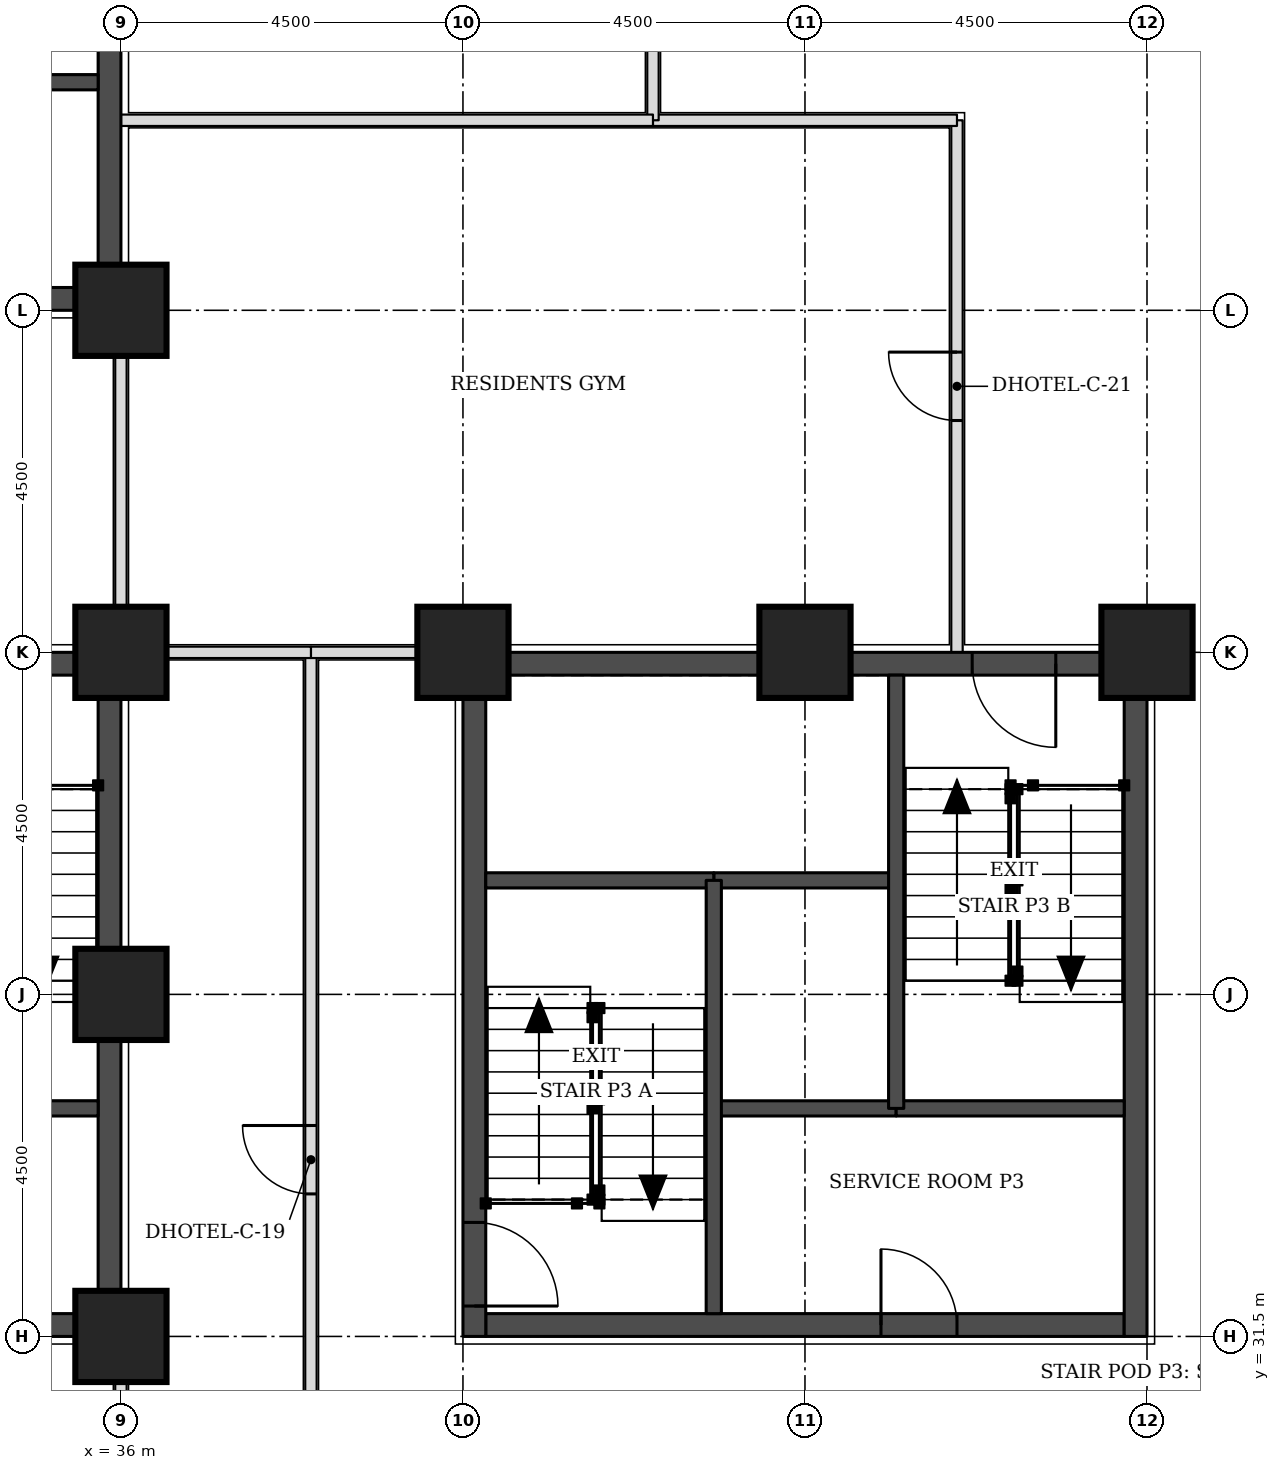
"""IFC4 building model, lengths in metres.
Left out: names, types, materials, properties, quantities, classifications, styles, units other than length and angle.
Written with IfcOpenShell. Run it as: python <this file> out.ifc"""

import sys

from ifc_helpers import new_model, si_unit, direction, frame, frame_2d, origin, origin_2d, place, context, subcontext, project, spatial, rectangle, extrude, element, fill, save


model = new_model("IFC4")
c1 = context("Model", 3, precision=1e-05, world=origin(), true_north=direction((0.0, 1.0)))
c2 = subcontext(c1, "Body", "Model", "MODEL_VIEW")
j1 = project(units=[si_unit("LENGTHUNIT", "METRE"), si_unit("PLANEANGLEUNIT", "RADIAN")], contexts=[c1])
p1 = place(None, origin())
s1 = spatial("IfcSite", under=j1, at=p1, CompositionType="ELEMENT")
p2 = place(p1, origin())
s2 = spatial("IfcBuilding", under=s1, at=p2, CompositionType="ELEMENT")
p3 = place(p2, frame((0.0, 0.0, 56.1)))
s3 = spatial("IfcBuildingStorey", under=s2, at=p3, CompositionType="ELEMENT", Elevation=56.1)
for number, where, z_axis, x_axis in (
    (1, (36.0, 31.5, 0.0), (0.0, 0.0, 1.0), (1.0, 0.0, 0.0)),
    (2, (36.0, 36.0, 0.0), (0.0, 0.0, 1.0), (1.0, 0.0, 0.0)),
    (3, (36.0, 40.5, 0.0), (0.0, 0.0, 1.0), (1.0, 0.0, 0.0)),
    (4, (40.5, 40.5, 0.0), (0.0, 0.0, 1.0), (1.0, 0.0, 0.0)),
    (5, (45.0, 40.5, 0.0), (0.0, 0.0, 1.0), (1.0, 0.0, 0.0)),
    (6, (49.5, 40.5, 0.0), (0.0, 0.0, 1.0), (1.0, 0.0, 0.0)),
    (7, (36.0, 45.0, 0.0), (0.0, 0.0, 1.0), (1.0, 0.0, 0.0)),
):
    element("IfcColumn", number, at=place(p3, frame(where, z_axis=z_axis, x_axis=x_axis)), inside=s3, PredefinedType="COLUMN", context=c2, shape_type="SweptSolid", body=[
        extrude(rectangle(XDim=1.2, YDim=1.2, at=origin_2d()), origin(), (0.0, 0.0, 1.0), 3.3),
    ])
p4 = place(p3, frame((27.3, 45.15, 0.0), z_axis=(0.0, 0.0, 1.0), x_axis=(1.0, 0.0, 0.0)))
e8 = element("IfcWall", 8, at=p4, inside=s3, PredefinedType="SHEAR", context=c2, shape_type="SweptSolid", body=[
    extrude(rectangle(XDim=8.4, YDim=0.3, at=frame_2d((4.2, 0.0))), origin(), (0.0, 0.0, 1.0), 3.3),
])
p5 = place(p4, frame((5.2, 0.0, 0.0)))
e9 = element("IfcOpeningElement", 9, at=p5, cuts=e8, PredefinedType="OPENING", context=c2, shape_type="SweptSolid", body=[
    extrude(rectangle(XDim=1.0, YDim=2.1, at=frame_2d((0.5, 1.05))), frame((0.0, 0.16, 0.0), z_axis=(0.0, -1.0, 0.0), x_axis=(1.0, 0.0, 0.0)), (0.0, 0.0, 1.0), 0.32),
])
p6 = place(p3, frame((35.85, 45.0, 0.0), z_axis=(0.0, 0.0, 1.0), x_axis=(0.0, 1.0, 0.0)))
e10 = element("IfcWall", 10, at=p6, inside=s3, PredefinedType="SHEAR", context=c2, shape_type="SweptSolid", body=[
    extrude(rectangle(XDim=9.0, YDim=0.3, at=frame_2d((4.5, 0.0))), origin(), (0.0, 0.0, 1.0), 3.3),
])
p7 = place(p3, frame((40.8, 31.65, 0.0), z_axis=(0.0, 0.0, 1.0), x_axis=(1.0, 0.0, 0.0)))
e11 = element("IfcWall", 11, at=p7, inside=s3, PredefinedType="SHEAR", context=c2, shape_type="SweptSolid", body=[
    extrude(rectangle(XDim=8.4, YDim=0.3, at=frame_2d((4.2, 0.0))), origin(), (0.0, 0.0, 1.0), 3.3),
])
p8 = place(p7, frame((5.2, 0.0, 0.0)))
e12 = element("IfcOpeningElement", 12, at=p8, cuts=e11, PredefinedType="OPENING", context=c2, shape_type="SweptSolid", body=[
    extrude(rectangle(XDim=1.0, YDim=2.1, at=frame_2d((0.5, 1.05))), frame((0.0, 0.16, 0.0), z_axis=(0.0, -1.0, 0.0), x_axis=(1.0, 0.0, 0.0)), (0.0, 0.0, 1.0), 0.32),
])
p9 = place(p3, frame((40.8, 40.35, 0.0), z_axis=(0.0, 0.0, 1.0), x_axis=(1.0, 0.0, 0.0)))
e13 = element("IfcWall", 13, at=p9, inside=s3, PredefinedType="SHEAR", context=c2, shape_type="SweptSolid", body=[
    extrude(rectangle(XDim=8.4, YDim=0.3, at=frame_2d((4.2, 0.0))), origin(), (0.0, 0.0, 1.0), 3.3),
])
p10 = place(p9, frame((6.4, 0.0, 0.0)))
e14 = element("IfcOpeningElement", 14, at=p10, cuts=e13, PredefinedType="OPENING", context=c2, shape_type="SweptSolid", body=[
    extrude(rectangle(XDim=1.1, YDim=2.1, at=frame_2d((0.55, 1.05))), frame((0.0, 0.16, 0.0), z_axis=(0.0, -1.0, 0.0), x_axis=(1.0, 0.0, 0.0)), (0.0, 0.0, 1.0), 0.32),
])
p11 = place(p3, frame((40.65, 31.5, 0.0), z_axis=(0.0, 0.0, 1.0), x_axis=(0.0, 1.0, 0.0)))
e15 = element("IfcWall", 15, at=p11, inside=s3, PredefinedType="SHEAR", context=c2, shape_type="SweptSolid", body=[
    extrude(rectangle(XDim=9.0, YDim=0.3, at=frame_2d((4.5, 0.0))), origin(), (0.0, 0.0, 1.0), 3.3),
])
p12 = place(p11, frame((0.4, 0.0, 0.0)))
e16 = element("IfcOpeningElement", 16, at=p12, cuts=e15, PredefinedType="OPENING", context=c2, shape_type="SweptSolid", body=[
    extrude(rectangle(XDim=1.1, YDim=2.1, at=frame_2d((0.55, 1.05))), frame((0.0, 0.16, 0.0), z_axis=(0.0, -1.0, 0.0), x_axis=(1.0, 0.0, 0.0)), (0.0, 0.0, 1.0), 0.32),
])
p13 = place(p3, frame((49.35, 31.5, 0.0), z_axis=(0.0, 0.0, 1.0), x_axis=(0.0, 1.0, 0.0)))
e17 = element("IfcWall", 17, at=p13, inside=s3, PredefinedType="SHEAR", context=c2, shape_type="SweptSolid", body=[
    extrude(rectangle(XDim=9.0, YDim=0.3, at=frame_2d((4.5, 0.0))), origin(), (0.0, 0.0, 1.0), 3.3),
])
p14 = place(p3, frame((27.3, 31.65, 0.0), z_axis=(0.0, 0.0, 1.0), x_axis=(1.0, 0.0, 0.0)))
e18 = element("IfcWall", 18, at=p14, inside=s3, PredefinedType="SHEAR", context=c2, shape_type="SweptSolid", body=[
    extrude(rectangle(XDim=8.4, YDim=0.3, at=frame_2d((4.2, 0.0))), origin(), (0.0, 0.0, 1.0), 3.3),
])
p15 = place(p14, frame((4.8, 0.0, 0.0)))
e19 = element("IfcOpeningElement", 19, at=p15, cuts=e18, PredefinedType="OPENING", context=c2, shape_type="SweptSolid", body=[
    extrude(rectangle(XDim=1.8, YDim=2.1, at=frame_2d((0.9, 1.05))), frame((0.0, 0.16, 0.0), z_axis=(0.0, -1.0, 0.0), x_axis=(1.0, 0.0, 0.0)), (0.0, 0.0, 1.0), 0.32),
])
p16 = place(p3, frame((27.3, 40.35, 0.0), z_axis=(0.0, 0.0, 1.0), x_axis=(1.0, 0.0, 0.0)))
e20 = element("IfcWall", 20, at=p16, inside=s3, PredefinedType="SHEAR", context=c2, shape_type="SweptSolid", body=[
    extrude(rectangle(XDim=8.4, YDim=0.3, at=frame_2d((4.2, 0.0))), origin(), (0.0, 0.0, 1.0), 3.3),
])
p17 = place(p16, frame((6.4, 0.0, 0.0)))
e21 = element("IfcOpeningElement", 21, at=p17, cuts=e20, PredefinedType="OPENING", context=c2, shape_type="SweptSolid", body=[
    extrude(rectangle(XDim=1.1, YDim=2.1, at=frame_2d((0.55, 1.05))), frame((0.0, 0.16, 0.0), z_axis=(0.0, -1.0, 0.0), x_axis=(1.0, 0.0, 0.0)), (0.0, 0.0, 1.0), 0.32),
])
p18 = place(p3, frame((35.85, 31.5, 0.0), z_axis=(0.0, 0.0, 1.0), x_axis=(0.0, 1.0, 0.0)))
e22 = element("IfcWall", 22, at=p18, inside=s3, PredefinedType="SHEAR", context=c2, shape_type="SweptSolid", body=[
    extrude(rectangle(XDim=9.0, YDim=0.3, at=frame_2d((4.5, 0.0))), origin(), (0.0, 0.0, 1.0), 3.3),
])
p19 = place(p3, frame((38.5, 27.15, 0.0), z_axis=(0.0, 0.0, 1.0), x_axis=(0.0, 1.0, 0.0)))
e23 = element("IfcWall", 23, at=p19, inside=s3, PredefinedType="PARTITIONING", context=c2, shape_type="SweptSolid", body=[
    extrude(rectangle(XDim=13.35, YDim=0.15, at=frame_2d((6.675, 0.0))), origin(), (0.0, 0.0, 1.0), 3.08),
])
p20 = place(p19, frame((6.225, 0.0, 0.0)))
e24 = element("IfcOpeningElement", 24, at=p20, cuts=e23, PredefinedType="OPENING", context=c2, shape_type="SweptSolid", body=[
    extrude(rectangle(XDim=0.9, YDim=2.1, at=frame_2d((0.45, 1.05))), frame((0.0, 0.085, 0.0), z_axis=(0.0, -1.0, 0.0), x_axis=(1.0, 0.0, 0.0)), (0.0, 0.0, 1.0), 0.17),
])
for number, where, z_axis, x_axis in (
    (25, (36.0, 29.5, 0.0), (0.0, 0.0, 1.0), (0.0, 1.0, 0.0)),
    (26, (38.5, 40.5, 0.0), (0.0, 0.0, 1.0), (1.0, 0.0, 0.0)),
):
    element("IfcWall", number, at=place(p3, frame(where, z_axis=z_axis, x_axis=x_axis)), inside=s3, PredefinedType="PARTITIONING", context=c2, shape_type="SweptSolid", body=[
        extrude(rectangle(XDim=1.95, YDim=0.15, at=frame_2d((0.975, 0.0))), origin(), (0.0, 0.0, 1.0), 2.33),
    ])
p21 = place(p3, frame((36.0, 40.55, 0.0), z_axis=(0.0, 0.0, 1.0), x_axis=(0.0, 1.0, 0.0)))
e27 = element("IfcWall", 27, at=p21, inside=s3, PredefinedType="PARTITIONING", context=c2, shape_type="SweptSolid", body=[
    extrude(rectangle(XDim=4.4, YDim=0.15, at=frame_2d((2.2, 0.0))), origin(), (0.0, 0.0, 1.0), 2.33),
])
p22 = place(p3, frame((47.0, 40.5, 0.0), z_axis=(0.0, 0.0, 1.0), x_axis=(0.0, 1.0, 0.0)))
e28 = element("IfcWall", 28, at=p22, inside=s3, PredefinedType="PARTITIONING", context=c2, shape_type="SweptSolid", body=[
    extrude(rectangle(XDim=7.0, YDim=0.15, at=frame_2d((3.5, 0.0))), origin(), (0.0, 0.0, 1.0), 3.08),
])
p23 = place(p22, frame((3.05, 0.0, 0.0)))
e29 = element("IfcOpeningElement", 29, at=p23, cuts=e28, PredefinedType="OPENING", context=c2, shape_type="SweptSolid", body=[
    extrude(rectangle(XDim=0.9, YDim=2.1, at=frame_2d((0.45, 1.05))), frame((0.0, 0.085, 0.0), z_axis=(0.0, -1.0, 0.0), x_axis=(1.0, 0.0, 0.0)), (0.0, 0.0, 1.0), 0.17),
])
p24 = place(p3, frame((43.0, 47.5, 0.0), z_axis=(0.0, 0.0, 1.0), x_axis=(1.0, 0.0, 0.0)))
e30 = element("IfcWall", 30, at=p24, inside=s3, PredefinedType="PARTITIONING", context=c2, shape_type="SweptSolid", body=[
    extrude(rectangle(XDim=4.0, YDim=0.15, at=frame_2d((2.0, 0.0))), origin(), (0.0, 0.0, 1.0), 3.08),
])
p25 = place(p3, frame((43.0, 47.5, 0.0), z_axis=(0.0, 0.0, 1.0), x_axis=(0.0, 1.0, 0.0)))
e31 = element("IfcWall", 31, at=p25, inside=s3, PredefinedType="PARTITIONING", context=c2, shape_type="SweptSolid", body=[
    extrude(rectangle(XDim=6.5, YDim=0.15, at=frame_2d((3.25, 0.0))), origin(), (0.0, 0.0, 1.0), 3.08),
])
p26 = place(p3, frame((36.05, 40.5, 0.0), z_axis=(0.0, 0.0, 1.0), x_axis=(1.0, 0.0, 0.0)))
e32 = element("IfcWall", 32, at=p26, inside=s3, PredefinedType="PARTITIONING", context=c2, shape_type="SweptSolid", body=[
    extrude(rectangle(XDim=2.45, YDim=0.15, at=frame_2d((1.225, 0.0))), origin(), (0.0, 0.0, 1.0), 2.33),
])
p27 = place(p3, frame((36.0, 47.5, 0.0), z_axis=(0.0, 0.0, 1.0), x_axis=(1.0, 0.0, 0.0)))
e33 = element("IfcWall", 33, at=p27, inside=s3, PredefinedType="PARTITIONING", context=c2, shape_type="SweptSolid", body=[
    extrude(rectangle(XDim=7.0, YDim=0.15, at=frame_2d((3.5, 0.0))), origin(), (0.0, 0.0, 1.0), 3.08),
])
p28 = place(p3, frame((32.7, 48.0, 0.0), z_axis=(0.0, 0.0, 1.0), x_axis=(1.0, 0.0, 0.0)))
e34 = element("IfcWall", 34, at=p28, inside=s3, PredefinedType="SOLIDWALL", context=c2, shape_type="SweptSolid", body=[
    extrude(rectangle(XDim=3.0, YDim=0.2, at=frame_2d((1.5, 0.0))), origin(), (0.0, 0.0, 1.0), 3.08),
])
p29 = place(p3, frame((43.8, 34.5, 0.0), z_axis=(0.0, 0.0, 1.0), x_axis=(1.0, 0.0, 0.0)))
e35 = element("IfcWall", 35, at=p29, inside=s3, PredefinedType="SOLIDWALL", context=c2, shape_type="SweptSolid", body=[
    extrude(rectangle(XDim=2.4, YDim=0.2, at=frame_2d((1.2, 0.0))), origin(), (0.0, 0.0, 1.0), 3.08),
])
p30 = place(p3, frame((46.2, 34.5, 0.0), z_axis=(0.0, 0.0, 1.0), x_axis=(1.0, 0.0, 0.0)))
e36 = element("IfcWall", 36, at=p30, inside=s3, PredefinedType="SOLIDWALL", context=c2, shape_type="SweptSolid", body=[
    extrude(rectangle(XDim=3.0, YDim=0.2, at=frame_2d((1.5, 0.0))), origin(), (0.0, 0.0, 1.0), 3.08),
])
p31 = place(p3, frame((43.8, 37.5, 0.0), z_axis=(0.0, 0.0, 1.0), x_axis=(1.0, 0.0, 0.0)))
e37 = element("IfcWall", 37, at=p31, inside=s3, PredefinedType="SOLIDWALL", context=c2, shape_type="SweptSolid", body=[
    extrude(rectangle(XDim=2.4, YDim=0.2, at=frame_2d((1.2, 0.0))), origin(), (0.0, 0.0, 1.0), 3.3),
])
p32 = place(p3, frame((40.8, 37.5, 0.0), z_axis=(0.0, 0.0, 1.0), x_axis=(1.0, 0.0, 0.0)))
e38 = element("IfcWall", 38, at=p32, inside=s3, PredefinedType="SOLIDWALL", context=c2, shape_type="SweptSolid", body=[
    extrude(rectangle(XDim=3.0, YDim=0.2, at=frame_2d((1.5, 0.0))), origin(), (0.0, 0.0, 1.0), 3.08),
])
for number, where, z_axis, x_axis in (
    (39, (43.8, 31.8, 0.0), (0.0, 0.0, 1.0), (0.0, 1.0, 0.0)),
    (40, (46.2, 34.5, 0.0), (0.0, 0.0, 1.0), (0.0, 1.0, 0.0)),
):
    element("IfcWall", number, at=place(p3, frame(where, z_axis=z_axis, x_axis=x_axis)), inside=s3, PredefinedType="SOLIDWALL", context=c2, shape_type="SweptSolid", body=[
        extrude(rectangle(XDim=5.7, YDim=0.2, at=frame_2d((2.85, 0.0))), origin(), (0.0, 0.0, 1.0), 3.08),
    ])
p33 = place(p3, frame((30.3, 34.5, 0.0), z_axis=(0.0, 0.0, 1.0), x_axis=(1.0, 0.0, 0.0)))
e41 = element("IfcWall", 41, at=p33, inside=s3, PredefinedType="SOLIDWALL", context=c2, shape_type="SweptSolid", body=[
    extrude(rectangle(XDim=5.4, YDim=0.2, at=frame_2d((2.7, 0.0))), origin(), (0.0, 0.0, 1.0), 3.08),
])
p34 = place(p33, frame((0.45, 0.0, 0.0)))
e42 = element("IfcOpeningElement", 42, at=p34, cuts=e41, PredefinedType="OPENING", context=c2, shape_type="SweptSolid", body=[
    extrude(rectangle(XDim=1.5, YDim=2.1, at=frame_2d((0.75, 1.05))), frame((0.0, 0.11, 0.0), z_axis=(0.0, -1.0, 0.0), x_axis=(1.0, 0.0, 0.0)), (0.0, 0.0, 1.0), 0.22),
])
p35 = place(p20, origin())
e43 = element("IfcDoor", 43, at=p35, inside=s3, OperationType="SINGLE_SWING_RIGHT", PredefinedType="DOOR", context=c2, shape_type="SweptSolid", body=[
    extrude(rectangle(XDim=0.9, YDim=2.1, at=frame_2d((0.45, 1.05))), frame((0.0, 0.025, 0.0), z_axis=(0.0, -1.0, 0.0), x_axis=(1.0, 0.0, 0.0)), (0.0, 0.0, 1.0), 0.05),
])
fill(e24, e43)
p36 = place(p23, origin())
e44 = element("IfcDoor", 44, at=p36, inside=s3, OperationType="SINGLE_SWING_RIGHT", PredefinedType="DOOR", context=c2, shape_type="SweptSolid", body=[
    extrude(rectangle(XDim=0.9, YDim=2.1, at=frame_2d((0.45, 1.05))), frame((0.0, 0.025, 0.0), z_axis=(0.0, -1.0, 0.0), x_axis=(1.0, 0.0, 0.0)), (0.0, 0.0, 1.0), 0.05),
])
fill(e29, e44)
p37 = place(p12, frame((1.1, 0.0, 0.0), z_axis=(0.0, 0.0, 1.0), x_axis=(-1.0, 0.0, 0.0)))
e45 = element("IfcDoor", 45, at=p37, inside=s3, OperationType="SINGLE_SWING_RIGHT", PredefinedType="DOOR", context=c2, shape_type="SweptSolid", body=[
    extrude(rectangle(XDim=1.1, YDim=2.1, at=frame_2d((0.55, 1.05))), frame((0.0, 0.025, 0.0), z_axis=(0.0, -1.0, 0.0), x_axis=(1.0, 0.0, 0.0)), (0.0, 0.0, 1.0), 0.05),
])
fill(e16, e45)
p38 = place(p10, frame((1.1, 0.0, 0.0), z_axis=(0.0, 0.0, 1.0), x_axis=(-1.0, 0.0, 0.0)))
e46 = element("IfcDoor", 46, at=p38, inside=s3, OperationType="SINGLE_SWING_LEFT", PredefinedType="DOOR", context=c2, shape_type="SweptSolid", body=[
    extrude(rectangle(XDim=1.1, YDim=2.1, at=frame_2d((0.55, 1.05))), frame((0.0, 0.025, 0.0), z_axis=(0.0, -1.0, 0.0), x_axis=(1.0, 0.0, 0.0)), (0.0, 0.0, 1.0), 0.05),
])
fill(e14, e46)
p39 = place(p8, origin())
e47 = element("IfcDoor", 47, at=p39, inside=s3, OperationType="SINGLE_SWING_LEFT", PredefinedType="DOOR", context=c2, shape_type="SweptSolid", body=[
    extrude(rectangle(XDim=1.0, YDim=2.1, at=frame_2d((0.5, 1.05))), frame((0.0, 0.025, 0.0), z_axis=(0.0, -1.0, 0.0), x_axis=(1.0, 0.0, 0.0)), (0.0, 0.0, 1.0), 0.05),
])
fill(e12, e47)
save(model, sys.argv[1])
